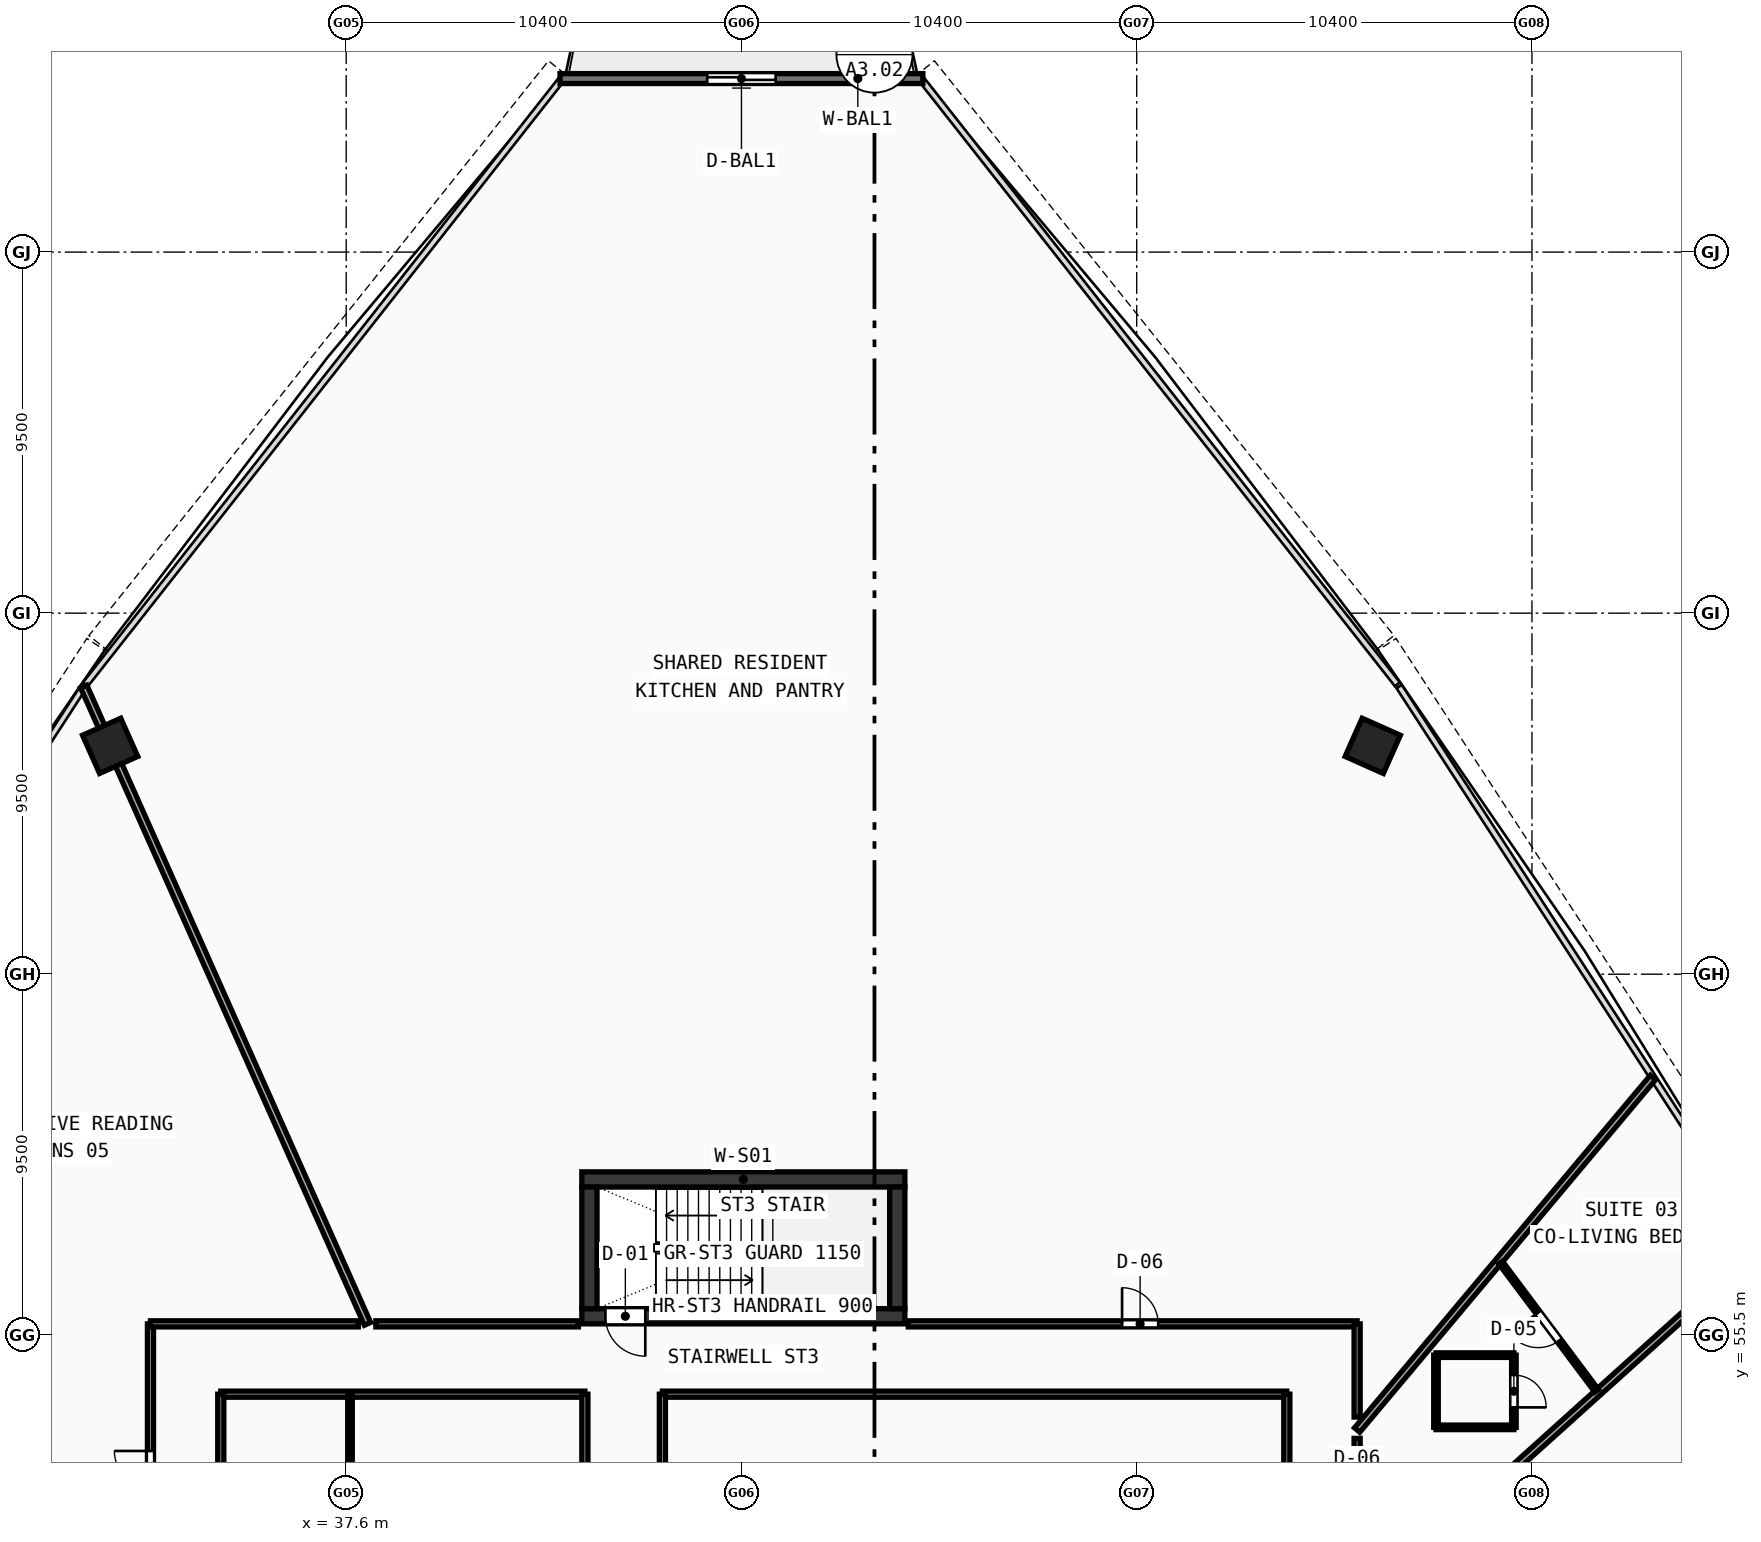
"""IFC4 building model, lengths in metres.
Left out: names, types, materials, properties, quantities, classifications, styles, units other than length and angle.
Written with IfcOpenShell. Run it as: python <this file> out.ifc"""

import sys

from ifc_helpers import new_model, si_unit, direction, frame, frame_2d, origin, origin_with_axes, origin_2d, place, context, subcontext, project, spatial, rectangle, hollow_rectangle, extrude, source, transform, mapped, element, fill, save


model = new_model("IFC4")
c1 = context("Model", 3, precision=1e-05, world=origin(), true_north=direction((0.0, 1.0)))
c2 = subcontext(c1, "Body", "Model", "MODEL_VIEW")
j1 = project(units=[si_unit("LENGTHUNIT", "METRE"), si_unit("PLANEANGLEUNIT", "RADIAN")], contexts=[c1])
p1 = place(None, origin())
s1 = spatial("IfcSite", under=j1, at=p1, CompositionType="ELEMENT")
p2 = place(p1, origin())
s2 = spatial("IfcBuilding", under=s1, at=p2, CompositionType="ELEMENT")
p3 = place(p2, frame((0.0, 0.0, 44.92)))
s3 = spatial("IfcBuildingStorey", under=s2, at=p3, CompositionType="ELEMENT", Elevation=44.92)
p4 = place(p3, frame((43.8, 59.6, 0.0), z_axis=(0.0, 0.0, 1.0), x_axis=(1.0, 0.0, 0.0)))
e1 = element("IfcWall", 1, at=p4, inside=s3, PredefinedType="SHEAR", context=c2, shape_type="SweptSolid", body=[
    extrude(rectangle(XDim=8.5, YDim=0.4, at=frame_2d((4.25, 0.0))), origin(), (0.0, 0.0, 1.0), 3.37),
])
p5 = place(p3, frame((43.8, 56.0, 0.0), z_axis=(0.0, 0.0, 1.0), x_axis=(1.0, 0.0, 0.0)))
e2 = element("IfcWall", 2, at=p5, inside=s3, PredefinedType="SHEAR", context=c2, shape_type="SweptSolid", body=[
    extrude(rectangle(XDim=8.5, YDim=0.4, at=frame_2d((4.25, 0.0))), origin(), (0.0, 0.0, 1.0), 3.37),
])
p6 = place(p5, frame((0.62, 0.0, 0.0)))
e3 = element("IfcOpeningElement", 3, at=p6, cuts=e2, PredefinedType="OPENING", context=c2, shape_type="SweptSolid", body=[
    extrude(rectangle(XDim=1.05, YDim=2.1, at=frame_2d((0.525, 1.05))), frame((0.0, 0.21, 0.0), z_axis=(0.0, -1.0, 0.0), x_axis=(1.0, 0.0, 0.0)), (0.0, 0.0, 1.0), 0.42),
])
for number, where, z_axis, x_axis in (
    (4, (44.0, 56.2, 0.0), (0.0, 0.0, 1.0), (0.0, 1.0, 0.0)),
    (5, (52.1, 56.2, 0.0), (0.0, 0.0, 1.0), (0.0, 1.0, 0.0)),
):
    element("IfcWall", number, at=place(p3, frame(where, z_axis=z_axis, x_axis=x_axis)), inside=s3, PredefinedType="SHEAR", context=c2, shape_type="SweptSolid", body=[
        extrude(rectangle(XDim=3.2, YDim=0.4, at=frame_2d((1.6, 0.0))), origin(), (0.0, 0.0, 1.0), 3.37),
    ])
m1 = source(origin(), c2, "Body", "SweptSolid", [
    extrude(hollow_rectangle(XDim=1.1, YDim=1.1, WallThickness=0.045, at=origin_2d()), origin(), (0.0, 0.0, 1.0), 3.63),
])
for number, where, z_axis, x_axis in (
    (6, (64.611, 71.009, -0.26), (0.0, 0.0, 1.0), (-0.914, 0.407, 0.0)),
    (7, (31.389, 71.009, -0.26), (0.0, 0.0, 1.0), (-0.914, -0.407, 0.0)),
):
    element("IfcColumn", number, at=place(p3, frame(where, z_axis=z_axis, x_axis=x_axis)), inside=s3, PredefinedType="COLUMN", context=c2, shape_type="MappedRepresentation", body=[
        mapped(m1, transform((0.0, 0.0, 0.0), scale=1.0)),
    ])
p7 = place(p3, frame((52.773, 88.566, 0.0), z_axis=(0.0, 0.0, 1.0), x_axis=(-1.0, 0.0, 0.0)))
e8 = element("IfcWall", 8, at=p7, inside=s3, PredefinedType="STANDARD", context=c2, shape_type="SweptSolid", body=[
    extrude(rectangle(XDim=9.546, YDim=0.26, at=frame_2d((4.773, 0.0))), origin(), (0.0, 0.0, 1.0), 3.37),
])
p8 = place(p7, frame((3.873, 0.0, 0.0)))
e9 = element("IfcOpeningElement", 9, at=p8, cuts=e8, PredefinedType="OPENING", context=c2, shape_type="SweptSolid", body=[
    extrude(rectangle(XDim=1.8, YDim=2.15, at=frame_2d((0.9, 1.075))), frame((0.0, 0.14, 0.0), z_axis=(0.0, -1.0, 0.0), x_axis=(1.0, 0.0, 0.0)), (0.0, 0.0, 1.0), 0.28),
])
p9 = place(p3, frame((34.3, 53.95, 0.0), z_axis=(0.0, 0.0, 1.0), x_axis=(1.0, 0.0, 0.0)))
e10 = element("IfcWall", 10, at=p9, inside=s3, PredefinedType="PARTITIONING", context=c2, shape_type="SweptSolid", body=[
    extrude(rectangle(XDim=9.58, YDim=0.16, at=frame_2d((4.79, 0.0))), origin(), (0.0, 0.0, 1.0), 2.67),
])
for number, where, z_axis, x_axis in (
    (11, (34.3, 42.25, 0.0), (0.0, 0.0, 1.0), (0.0, 1.0, 0.0)),
    (12, (43.88, 42.25, 0.0), (0.0, 0.0, 1.0), (0.0, 1.0, 0.0)),
):
    element("IfcWall", number, at=place(p3, frame(where, z_axis=z_axis, x_axis=x_axis)), inside=s3, PredefinedType="PARTITIONING", context=c2, shape_type="SweptSolid", body=[
        extrude(rectangle(XDim=11.7, YDim=0.16, at=frame_2d((5.85, 0.0))), origin(), (0.0, 0.0, 1.0), 2.67),
    ])
p10 = place(p3, frame((37.7, 42.25, 0.0), z_axis=(0.0, 0.0, 1.0), x_axis=(0.0, 1.0, 0.0)))
e13 = element("IfcWall", 13, at=p10, inside=s3, PredefinedType="PARTITIONING", context=c2, shape_type="SweptSolid", body=[
    extrude(rectangle(XDim=11.7, YDim=0.12, at=frame_2d((5.85, 0.0))), origin(), (0.0, 0.0, 1.0), 2.67),
])
p11 = place(p3, frame((45.92, 53.95, 0.0), z_axis=(0.0, 0.0, 1.0), x_axis=(1.0, 0.0, 0.0)))
e14 = element("IfcWall", 14, at=p11, inside=s3, PredefinedType="PARTITIONING", context=c2, shape_type="SweptSolid", body=[
    extrude(rectangle(XDim=16.43, YDim=0.16, at=frame_2d((8.215, 0.0))), origin(), (0.0, 0.0, 1.0), 2.67),
])
p12 = place(p3, frame((45.92, 42.25, 0.0), z_axis=(0.0, 0.0, 1.0), x_axis=(0.0, 1.0, 0.0)))
e15 = element("IfcWall", 15, at=p12, inside=s3, PredefinedType="PARTITIONING", context=c2, shape_type="SweptSolid", body=[
    extrude(rectangle(XDim=11.7, YDim=0.16, at=frame_2d((5.85, 0.0))), origin(), (0.0, 0.0, 1.0), 2.97),
])
p13 = place(p3, frame((62.35, 42.25, 0.0), z_axis=(0.0, 0.0, 1.0), x_axis=(0.0, 1.0, 0.0)))
e16 = element("IfcWall", 16, at=p13, inside=s3, PredefinedType="PARTITIONING", context=c2, shape_type="SweptSolid", body=[
    extrude(rectangle(XDim=11.7, YDim=0.16, at=frame_2d((5.85, 0.0))), origin(), (0.0, 0.0, 1.0), 2.67),
])
p14 = place(p3, frame((64.2, 48.287, 0.0), z_axis=(0.0, 0.0, 1.0), x_axis=(0.743156867614, 0.669117231969, 0.0)))
e17 = element("IfcWall", 17, at=p14, inside=s3, PredefinedType="PARTITIONING", context=c2, shape_type="SweptSolid", body=[
    extrude(rectangle(XDim=14.327, YDim=0.18, at=frame_2d((7.164, 0.0))), origin(), (0.0, 0.0, 1.0), 2.67),
])
p15 = place(p3, frame((64.2, 53.006, 0.0), z_axis=(0.0, 0.0, 1.0), x_axis=(0.642786334534, 0.766045513098, 0.0)))
e18 = element("IfcWall", 18, at=p15, inside=s3, PredefinedType="PARTITIONING", context=c2, shape_type="SweptSolid", body=[
    extrude(rectangle(XDim=12.11, YDim=0.18, at=frame_2d((6.055, 0.0))), origin(), (0.0, 0.0, 1.0), 2.67),
])
p16 = place(p3, frame((38.16, 55.8, 0.0), z_axis=(0.0, 0.0, 1.0), x_axis=(-0.406730734994, 0.913548088067, 0.0)))
e19 = element("IfcWall", 19, at=p16, inside=s3, PredefinedType="PARTITIONING", context=c2, shape_type="SweptSolid", body=[
    extrude(rectangle(XDim=18.356, YDim=0.18, at=frame_2d((9.178, 0.0))), origin(), (0.0, 0.0, 1.0), 2.67),
])
p17 = place(p3, frame((32.45, 47.701, 0.0), z_axis=(0.0, 0.0, 1.0), x_axis=(-0.743155181141, 0.66911910505, 0.0)))
e20 = element("IfcWall", 20, at=p17, inside=s3, PredefinedType="PARTITIONING", context=c2, shape_type="SweptSolid", body=[
    extrude(rectangle(XDim=15.202, YDim=0.18, at=frame_2d((7.601, 0.0))), origin(), (0.0, 0.0, 1.0), 2.67),
])
p18 = place(p3, frame((32.45, 47.997, 0.0), z_axis=(0.0, 0.0, 1.0), x_axis=(0.0, 1.0, 0.0)))
e21 = element("IfcWall", 21, at=p18, inside=s3, PredefinedType="PARTITIONING", context=c2, shape_type="SweptSolid", body=[
    extrude(rectangle(XDim=7.803, YDim=0.16, at=frame_2d((3.901, 0.0))), origin(), (0.0, 0.0, 1.0), 3.37),
])
p19 = place(p18, frame((3.508, 0.0, 0.0)))
e22 = element("IfcOpeningElement", 22, at=p19, cuts=e21, PredefinedType="OPENING", context=c2, shape_type="SweptSolid", body=[
    extrude(rectangle(XDim=0.95, YDim=2.1, at=frame_2d((0.475, 1.05))), frame((0.0, 0.09, 0.0), z_axis=(0.0, -1.0, 0.0), x_axis=(1.0, 0.0, 0.0)), (0.0, 0.0, 1.0), 0.18),
])
p20 = place(p3, frame((32.45, 55.8, 0.0), z_axis=(0.0, 0.0, 1.0), x_axis=(1.0, 0.0, 0.0)))
e23 = element("IfcWall", 23, at=p20, inside=s3, PredefinedType="PARTITIONING", context=c2, shape_type="SweptSolid", body=[
    extrude(rectangle(XDim=5.47, YDim=0.16, at=frame_2d((2.735, 0.0))), origin(), (0.0, 0.0, 1.0), 3.37),
])
p21 = place(p3, frame((38.38, 55.8, 0.0), z_axis=(0.0, 0.0, 1.0), x_axis=(1.0, 0.0, 0.0)))
e24 = element("IfcWall", 24, at=p21, inside=s3, PredefinedType="PARTITIONING", context=c2, shape_type="SweptSolid", body=[
    extrude(rectangle(XDim=5.329, YDim=0.16, at=frame_2d((2.665, 0.0))), origin(), (0.0, 0.0, 1.0), 2.67),
])
p22 = place(p3, frame((52.391, 55.8, 0.0), z_axis=(0.0, 0.0, 1.0), x_axis=(1.0, 0.0, 0.0)))
e25 = element("IfcWall", 25, at=p22, inside=s3, PredefinedType="PARTITIONING", context=c2, shape_type="SweptSolid", body=[
    extrude(rectangle(XDim=11.809, YDim=0.16, at=frame_2d((5.904, 0.0))), origin(), (0.0, 0.0, 1.0), 2.67),
])
p23 = place(p22, frame((5.624, 0.0, 0.0)))
e26 = element("IfcOpeningElement", 26, at=p23, cuts=e25, PredefinedType="OPENING", context=c2, shape_type="SweptSolid", body=[
    extrude(rectangle(XDim=0.95, YDim=2.1, at=frame_2d((0.475, 1.05))), frame((0.0, 0.09, 0.0), z_axis=(0.0, -1.0, 0.0), x_axis=(1.0, 0.0, 0.0)), (0.0, 0.0, 1.0), 0.18),
])
p24 = place(p3, frame((64.2, 55.8, 0.0), z_axis=(0.0, 0.0, 1.0), x_axis=(0.0, -1.0, 0.0)))
e27 = element("IfcWall", 27, at=p24, inside=s3, PredefinedType="PARTITIONING", context=c2, shape_type="SweptSolid", body=[
    extrude(rectangle(XDim=2.451, YDim=0.16, at=frame_2d((1.226, 0.0))), origin(), (0.0, 0.0, 1.0), 2.97),
])
p25 = place(p3, frame((64.2, 52.787, 0.0), z_axis=(0.0, 0.0, 1.0), x_axis=(0.0, -1.0, 0.0)))
e28 = element("IfcWall", 28, at=p25, inside=s3, PredefinedType="PARTITIONING", context=c2, shape_type="SweptSolid", body=[
    extrude(rectangle(XDim=4.204, YDim=0.16, at=frame_2d((2.102, 0.0))), origin(), (0.0, 0.0, 1.0), 3.37),
])
p26 = place(p25, frame((1.665, 0.0, 0.0)))
e29 = element("IfcOpeningElement", 29, at=p26, cuts=e28, PredefinedType="OPENING", context=c2, shape_type="SweptSolid", body=[
    extrude(rectangle(XDim=0.95, YDim=2.1, at=frame_2d((0.475, 1.05))), frame((0.0, 0.09, 0.0), z_axis=(0.0, -1.0, 0.0), x_axis=(1.0, 0.0, 0.0)), (0.0, 0.0, 1.0), 0.18),
])
p27 = place(p3, frame((66.275, 53.077, 0.0), z_axis=(0.0, 0.0, 1.0), x_axis=(1.0, 0.0, 0.0)))
e30 = element("IfcWall", 30, at=p27, inside=s3, PredefinedType="PARTITIONING", context=c2, shape_type="SweptSolid", body=[
    extrude(rectangle(XDim=2.05, YDim=0.12, at=frame_2d((1.025, 0.0))), origin(), (0.0, 0.0, 1.0), 2.97),
])
p28 = place(p3, frame((68.325, 53.077, 0.0), z_axis=(0.0, 0.0, 1.0), x_axis=(0.0, 1.0, 0.0)))
e31 = element("IfcWall", 31, at=p28, inside=s3, PredefinedType="PARTITIONING", context=c2, shape_type="SweptSolid", body=[
    extrude(rectangle(XDim=1.9, YDim=0.12, at=frame_2d((0.95, 0.0))), origin(), (0.0, 0.0, 1.0), 3.37),
])
p29 = place(p28, frame((0.525, 0.0, 0.0)))
e32 = element("IfcOpeningElement", 32, at=p29, cuts=e31, PredefinedType="OPENING", context=c2, shape_type="SweptSolid", body=[
    extrude(rectangle(XDim=0.85, YDim=2.1, at=frame_2d((0.425, 1.05))), frame((0.0, 0.07, 0.0), z_axis=(0.0, -1.0, 0.0), x_axis=(1.0, 0.0, 0.0)), (0.0, 0.0, 1.0), 0.14),
])
p30 = place(p3, frame((68.325, 54.977, 0.0), z_axis=(0.0, 0.0, 1.0), x_axis=(-1.0, 0.0, 0.0)))
e33 = element("IfcWall", 33, at=p30, inside=s3, PredefinedType="PARTITIONING", context=c2, shape_type="SweptSolid", body=[
    extrude(rectangle(XDim=2.05, YDim=0.12, at=frame_2d((1.025, 0.0))), origin(), (0.0, 0.0, 1.0), 3.37),
])
p31 = place(p3, frame((66.275, 54.977, 0.0), z_axis=(0.0, 0.0, 1.0), x_axis=(0.0, -1.0, 0.0)))
e34 = element("IfcWall", 34, at=p31, inside=s3, PredefinedType="PARTITIONING", context=c2, shape_type="SweptSolid", body=[
    extrude(rectangle(XDim=1.9, YDim=0.12, at=frame_2d((0.95, 0.0))), origin(), (0.0, 0.0, 1.0), 2.97),
])
p32 = place(p3, frame((70.501, 54.04, 0.0), z_axis=(0.0, 0.0, 1.0), x_axis=(-0.599443526822, 0.800417052636, 0.0)))
e35 = element("IfcWall", 35, at=p32, inside=s3, PredefinedType="PARTITIONING", context=c2, shape_type="SweptSolid", body=[
    extrude(rectangle(XDim=4.213, YDim=0.12, at=frame_2d((2.106, 0.0))), origin(), (0.0, 0.0, 1.0), 2.67),
])
p33 = place(p32, frame((1.646, 0.0, 0.0)))
e36 = element("IfcOpeningElement", 36, at=p33, cuts=e35, PredefinedType="OPENING", context=c2, shape_type="SweptSolid", body=[
    extrude(rectangle(XDim=0.92, YDim=2.1, at=frame_2d((0.46, 1.05))), frame((0.0, 0.07, 0.0), z_axis=(0.0, -1.0, 0.0), x_axis=(1.0, 0.0, 0.0)), (0.0, 0.0, 1.0), 0.14),
])
m2 = source(origin(), c2, "Body", "SweptSolid", [
    extrude(rectangle(XDim=1.8, YDim=2.15, at=frame_2d((0.9, 1.075))), frame((0.0, 0.025, 0.0), z_axis=(0.0, -1.0, 0.0), x_axis=(1.0, 0.0, 0.0)), (0.0, 0.0, 1.0), 0.05),
])
p34 = place(p8, origin_with_axes())
e37 = element("IfcDoor", 37, at=p34, inside=s3, OperationType="DOUBLE_DOOR_SLIDING", PredefinedType="DOOR", context=c2, shape_type="MappedRepresentation", body=[
    mapped(m2, transform((0.0, 0.0, 0.0), scale=1.0)),
])
fill(e9, e37)
m3 = source(origin(), c2, "Body", "SweptSolid", [
    extrude(rectangle(XDim=1.05, YDim=2.1, at=frame_2d((0.525, 1.05))), frame((0.0, 0.025, 0.0), z_axis=(0.0, -1.0, 0.0), x_axis=(1.0, 0.0, 0.0)), (0.0, 0.0, 1.0), 0.05),
])
p35 = place(p6, frame((1.05, 0.0, 0.0), z_axis=(0.0, 0.0, 1.0), x_axis=(-1.0, 0.0, 0.0)))
e38 = element("IfcDoor", 38, at=p35, inside=s3, OperationType="SINGLE_SWING_LEFT", PredefinedType="DOOR", context=c2, shape_type="MappedRepresentation", body=[
    mapped(m3, transform((0.0, 0.0, 0.0), scale=1.0)),
])
fill(e3, e38)
m4 = source(origin(), c2, "Body", "SweptSolid", [
    extrude(rectangle(XDim=0.85, YDim=2.1, at=frame_2d((0.425, 1.05))), frame((0.0, 0.025, 0.0), z_axis=(0.0, -1.0, 0.0), x_axis=(1.0, 0.0, 0.0)), (0.0, 0.0, 1.0), 0.05),
])
p36 = place(p29, frame((0.85, 0.0, 0.0), z_axis=(0.0, 0.0, 1.0), x_axis=(-1.0, 0.0, 0.0)))
e39 = element("IfcDoor", 39, at=p36, inside=s3, OperationType="SINGLE_SWING_RIGHT", PredefinedType="DOOR", context=c2, shape_type="MappedRepresentation", body=[
    mapped(m4, transform((0.0, 0.0, 0.0), scale=1.0)),
])
fill(e32, e39)
m5 = source(origin(), c2, "Body", "SweptSolid", [
    extrude(rectangle(XDim=0.92, YDim=2.1, at=frame_2d((0.46, 1.05))), frame((0.0, 0.025, 0.0), z_axis=(0.0, -1.0, 0.0), x_axis=(1.0, 0.0, 0.0)), (0.0, 0.0, 1.0), 0.05),
])
p37 = place(p33, origin_with_axes())
e40 = element("IfcDoor", 40, at=p37, inside=s3, OperationType="SINGLE_SWING_RIGHT", PredefinedType="DOOR", context=c2, shape_type="MappedRepresentation", body=[
    mapped(m5, transform((0.0, 0.0, 0.0), scale=1.0)),
])
fill(e36, e40)
m6 = source(origin(), c2, "Body", "SweptSolid", [
    extrude(rectangle(XDim=0.95, YDim=2.1, at=frame_2d((0.475, 1.05))), frame((0.0, 0.025, 0.0), z_axis=(0.0, -1.0, 0.0), x_axis=(1.0, 0.0, 0.0)), (0.0, 0.0, 1.0), 0.05),
])
p38 = place(p23, origin_with_axes())
e41 = element("IfcDoor", 41, at=p38, inside=s3, OperationType="SINGLE_SWING_LEFT", PredefinedType="DOOR", context=c2, shape_type="MappedRepresentation", body=[
    mapped(m6, transform((0.0, 0.0, 0.0), scale=1.0)),
])
fill(e26, e41)
p39 = place(p19, origin_with_axes())
e42 = element("IfcDoor", 42, at=p39, inside=s3, OperationType="SINGLE_SWING_RIGHT", PredefinedType="DOOR", context=c2, shape_type="MappedRepresentation", body=[
    mapped(m6, transform((0.0, 0.0, 0.0), scale=1.0)),
])
fill(e22, e42)
save(model, sys.argv[1])
